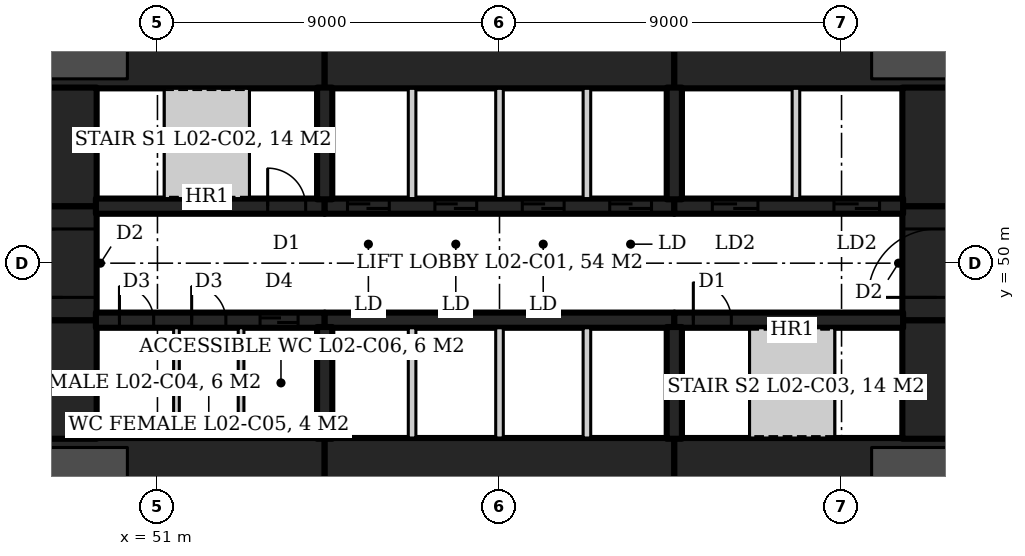
"""IFC4 building model, lengths in metres.
Left out: names, types, materials, properties, quantities, classifications, styles, units other than length and angle.
Written with IfcOpenShell. Run it as: python <this file> out.ifc"""

import sys

from ifc_helpers import new_model, si_unit, direction, frame, frame_2d, origin, origin_2d, place, context, subcontext, project, spatial, rectangle, circle, extrude, element, fill, save


model = new_model("IFC4")
c1 = context("Model", 3, precision=1e-05, world=origin(), true_north=direction((0.0, 1.0)))
c2 = subcontext(c1, "Body", "Model", "MODEL_VIEW")
j1 = project(units=[si_unit("LENGTHUNIT", "METRE"), si_unit("PLANEANGLEUNIT", "RADIAN")], contexts=[c1])
p1 = place(None, origin())
s1 = spatial("IfcSite", under=j1, at=p1, CompositionType="ELEMENT")
p2 = place(p1, origin())
s2 = spatial("IfcBuilding", under=s1, at=p2, CompositionType="ELEMENT")
p3 = place(p2, frame((0.0, 0.0, 15.0)))
s3 = spatial("IfcBuildingStorey", under=s2, at=p3, CompositionType="ELEMENT", Elevation=15.0)
for number, where, z_axis, x_axis in (
    (1, (71.691, 56.75, 0.0), (0.0, 0.0, 1.0), (1.0, 0.0, 0.0)),
    (2, (48.309, 56.75, 0.0), (0.0, 0.0, 1.0), (1.0, 0.0, 0.0)),
    (3, (48.309, 43.25, 0.0), (0.0, 0.0, 1.0), (1.0, 0.0, 0.0)),
    (4, (71.691, 43.25, 0.0), (0.0, 0.0, 1.0), (1.0, 0.0, 0.0)),
):
    element("IfcColumn", number, at=place(p3, frame(where, z_axis=z_axis, x_axis=x_axis)), inside=s3, PredefinedType="COLUMN", context=c2, shape_type="SweptSolid", body=[
        extrude(circle(Radius=1.9, at=origin_2d()), origin(), (0.0, 0.0, 1.0), 5.0),
    ])
p4 = place(p3, frame((47.6, 55.5, 0.0), z_axis=(0.0, 0.0, 1.0), x_axis=(1.0, 0.0, 0.0)))
e5 = element("IfcWall", 5, at=p4, inside=s3, PredefinedType="SHEAR", context=c2, shape_type="SweptSolid", body=[
    extrude(rectangle(XDim=7.8, YDim=1.8, at=frame_2d((3.9, 0.0))), origin(), (0.0, 0.0, 1.0), 5.0),
])
p5 = place(p3, frame((55.4, 55.5, 0.0), z_axis=(0.0, 0.0, 1.0), x_axis=(1.0, 0.0, 0.0)))
e6 = element("IfcWall", 6, at=p5, inside=s3, PredefinedType="SHEAR", context=c2, shape_type="SweptSolid", body=[
    extrude(rectangle(XDim=9.2, YDim=1.8, at=frame_2d((4.6, 0.0))), origin(), (0.0, 0.0, 1.0), 5.0),
])
for number, where, z_axis, x_axis in (
    (7, (64.6, 55.5, 0.0), (0.0, 0.0, 1.0), (1.0, 0.0, 0.0)),
    (8, (47.6, 44.5, 0.0), (0.0, 0.0, 1.0), (1.0, 0.0, 0.0)),
):
    element("IfcWall", number, at=place(p3, frame(where, z_axis=z_axis, x_axis=x_axis)), inside=s3, PredefinedType="SHEAR", context=c2, shape_type="SweptSolid", body=[
        extrude(rectangle(XDim=7.8, YDim=1.8, at=frame_2d((3.9, 0.0))), origin(), (0.0, 0.0, 1.0), 5.0),
    ])
p6 = place(p3, frame((55.4, 44.5, 0.0), z_axis=(0.0, 0.0, 1.0), x_axis=(1.0, 0.0, 0.0)))
e9 = element("IfcWall", 9, at=p6, inside=s3, PredefinedType="SHEAR", context=c2, shape_type="SweptSolid", body=[
    extrude(rectangle(XDim=9.2, YDim=1.8, at=frame_2d((4.6, 0.0))), origin(), (0.0, 0.0, 1.0), 5.0),
])
p7 = place(p3, frame((64.6, 44.5, 0.0), z_axis=(0.0, 0.0, 1.0), x_axis=(1.0, 0.0, 0.0)))
e10 = element("IfcWall", 10, at=p7, inside=s3, PredefinedType="SHEAR", context=c2, shape_type="SweptSolid", body=[
    extrude(rectangle(XDim=7.8, YDim=1.8, at=frame_2d((3.9, 0.0))), origin(), (0.0, 0.0, 1.0), 5.0),
])
p8 = place(p3, frame((71.5, 45.38, 0.0), z_axis=(0.0, 0.0, 1.0), x_axis=(0.0, 1.0, 0.0)))
e11 = element("IfcWall", 11, at=p8, inside=s3, PredefinedType="SHEAR", context=c2, shape_type="SweptSolid", body=[
    extrude(rectangle(XDim=3.12, YDim=1.8, at=frame_2d((1.56, 0.0))), origin(), (0.0, 0.0, 1.0), 5.0),
])
p9 = place(p3, frame((71.5, 48.5, 0.0), z_axis=(0.0, 0.0, 1.0), x_axis=(0.0, 1.0, 0.0)))
e12 = element("IfcWall", 12, at=p9, inside=s3, PredefinedType="SHEAR", context=c2, shape_type="SweptSolid", body=[
    extrude(rectangle(XDim=3.0, YDim=1.8, at=frame_2d((1.5, 0.0))), origin(), (0.0, 0.0, 1.0), 5.0),
])
p10 = place(p9, frame((0.6, 0.0, 0.0)))
e13 = element("IfcOpeningElement", 13, at=p10, cuts=e12, PredefinedType="OPENING", context=c2, shape_type="SweptSolid", body=[
    extrude(rectangle(XDim=1.8, YDim=2.1, at=frame_2d((0.9, 1.05))), frame((0.0, 0.91, 0.0), z_axis=(0.0, -1.0, 0.0), x_axis=(1.0, 0.0, 0.0)), (0.0, 0.0, 1.0), 1.82),
])
for number, where, z_axis, x_axis in (
    (14, (71.5, 51.5, 0.0), (0.0, 0.0, 1.0), (0.0, 1.0, 0.0)),
    (15, (48.5, 45.38, 0.0), (0.0, 0.0, 1.0), (0.0, 1.0, 0.0)),
):
    element("IfcWall", number, at=place(p3, frame(where, z_axis=z_axis, x_axis=x_axis)), inside=s3, PredefinedType="SHEAR", context=c2, shape_type="SweptSolid", body=[
        extrude(rectangle(XDim=3.12, YDim=1.8, at=frame_2d((1.56, 0.0))), origin(), (0.0, 0.0, 1.0), 5.0),
    ])
p11 = place(p3, frame((48.5, 48.5, 0.0), z_axis=(0.0, 0.0, 1.0), x_axis=(0.0, 1.0, 0.0)))
e16 = element("IfcWall", 16, at=p11, inside=s3, PredefinedType="SHEAR", context=c2, shape_type="SweptSolid", body=[
    extrude(rectangle(XDim=3.0, YDim=1.8, at=frame_2d((1.5, 0.0))), origin(), (0.0, 0.0, 1.0), 5.0),
])
p12 = place(p11, frame((0.6, 0.0, 0.0)))
e17 = element("IfcOpeningElement", 17, at=p12, cuts=e16, PredefinedType="OPENING", context=c2, shape_type="SweptSolid", body=[
    extrude(rectangle(XDim=1.8, YDim=2.1, at=frame_2d((0.9, 1.05))), frame((0.0, 0.91, 0.0), z_axis=(0.0, -1.0, 0.0), x_axis=(1.0, 0.0, 0.0)), (0.0, 0.0, 1.0), 1.82),
])
p13 = place(p3, frame((48.5, 51.5, 0.0), z_axis=(0.0, 0.0, 1.0), x_axis=(0.0, 1.0, 0.0)))
e18 = element("IfcWall", 18, at=p13, inside=s3, PredefinedType="SHEAR", context=c2, shape_type="SweptSolid", body=[
    extrude(rectangle(XDim=3.12, YDim=1.8, at=frame_2d((1.56, 0.0))), origin(), (0.0, 0.0, 1.0), 5.0),
])
p14 = place(p3, frame((49.38, 51.5, 0.0), z_axis=(0.0, 0.0, 1.0), x_axis=(1.0, 0.0, 0.0)))
e19 = element("IfcWall", 19, at=p14, inside=s3, PredefinedType="SHEAR", context=c2, shape_type="SweptSolid", body=[
    extrude(rectangle(XDim=6.02, YDim=0.4, at=frame_2d((3.01, 0.0))), origin(), (0.0, 0.0, 1.0), 5.0),
])
p15 = place(p14, frame((4.52, 0.0, 0.0)))
e20 = element("IfcOpeningElement", 20, at=p15, cuts=e19, PredefinedType="OPENING", context=c2, shape_type="SweptSolid", body=[
    extrude(rectangle(XDim=1.0, YDim=2.1, at=frame_2d((0.5, 1.05))), frame((0.0, 0.21, 0.0), z_axis=(0.0, -1.0, 0.0), x_axis=(1.0, 0.0, 0.0)), (0.0, 0.0, 1.0), 0.42),
])
p16 = place(p3, frame((55.4, 51.5, 0.0), z_axis=(0.0, 0.0, 1.0), x_axis=(1.0, 0.0, 0.0)))
e21 = element("IfcWall", 21, at=p16, inside=s3, PredefinedType="SHEAR", context=c2, shape_type="SweptSolid", body=[
    extrude(rectangle(XDim=9.2, YDim=0.4, at=frame_2d((4.6, 0.0))), origin(), (0.0, 0.0, 1.0), 5.0),
])
p17 = place(p16, frame((0.6, 0.0, 0.0)))
e22 = element("IfcOpeningElement", 22, at=p17, cuts=e21, PredefinedType="OPENING", context=c2, shape_type="SweptSolid", body=[
    extrude(rectangle(XDim=1.1, YDim=2.1, at=frame_2d((0.55, 1.05))), frame((0.0, 0.21, 0.0), z_axis=(0.0, -1.0, 0.0), x_axis=(1.0, 0.0, 0.0)), (0.0, 0.0, 1.0), 0.42),
])
p18 = place(p16, frame((2.9, 0.0, 0.0)))
e23 = element("IfcOpeningElement", 23, at=p18, cuts=e21, PredefinedType="OPENING", context=c2, shape_type="SweptSolid", body=[
    extrude(rectangle(XDim=1.1, YDim=2.1, at=frame_2d((0.55, 1.05))), frame((0.0, 0.21, 0.0), z_axis=(0.0, -1.0, 0.0), x_axis=(1.0, 0.0, 0.0)), (0.0, 0.0, 1.0), 0.42),
])
p19 = place(p16, frame((5.2, 0.0, 0.0)))
e24 = element("IfcOpeningElement", 24, at=p19, cuts=e21, PredefinedType="OPENING", context=c2, shape_type="SweptSolid", body=[
    extrude(rectangle(XDim=1.1, YDim=2.1, at=frame_2d((0.55, 1.05))), frame((0.0, 0.21, 0.0), z_axis=(0.0, -1.0, 0.0), x_axis=(1.0, 0.0, 0.0)), (0.0, 0.0, 1.0), 0.42),
])
p20 = place(p16, frame((7.5, 0.0, 0.0)))
e25 = element("IfcOpeningElement", 25, at=p20, cuts=e21, PredefinedType="OPENING", context=c2, shape_type="SweptSolid", body=[
    extrude(rectangle(XDim=1.1, YDim=2.1, at=frame_2d((0.55, 1.05))), frame((0.0, 0.21, 0.0), z_axis=(0.0, -1.0, 0.0), x_axis=(1.0, 0.0, 0.0)), (0.0, 0.0, 1.0), 0.42),
])
p21 = place(p3, frame((64.6, 51.5, 0.0), z_axis=(0.0, 0.0, 1.0), x_axis=(1.0, 0.0, 0.0)))
e26 = element("IfcWall", 26, at=p21, inside=s3, PredefinedType="SHEAR", context=c2, shape_type="SweptSolid", body=[
    extrude(rectangle(XDim=6.02, YDim=0.4, at=frame_2d((3.01, 0.0))), origin(), (0.0, 0.0, 1.0), 5.0),
])
p22 = place(p21, frame((1.0, 0.0, 0.0)))
e27 = element("IfcOpeningElement", 27, at=p22, cuts=e26, PredefinedType="OPENING", context=c2, shape_type="SweptSolid", body=[
    extrude(rectangle(XDim=1.2, YDim=2.1, at=frame_2d((0.6, 1.05))), frame((0.0, 0.21, 0.0), z_axis=(0.0, -1.0, 0.0), x_axis=(1.0, 0.0, 0.0)), (0.0, 0.0, 1.0), 0.42),
])
p23 = place(p21, frame((4.2, 0.0, 0.0)))
e28 = element("IfcOpeningElement", 28, at=p23, cuts=e26, PredefinedType="OPENING", context=c2, shape_type="SweptSolid", body=[
    extrude(rectangle(XDim=1.2, YDim=2.1, at=frame_2d((0.6, 1.05))), frame((0.0, 0.21, 0.0), z_axis=(0.0, -1.0, 0.0), x_axis=(1.0, 0.0, 0.0)), (0.0, 0.0, 1.0), 0.42),
])
p24 = place(p3, frame((49.38, 48.5, 0.0), z_axis=(0.0, 0.0, 1.0), x_axis=(1.0, 0.0, 0.0)))
e29 = element("IfcWall", 29, at=p24, inside=s3, PredefinedType="SHEAR", context=c2, shape_type="SweptSolid", body=[
    extrude(rectangle(XDim=6.02, YDim=0.4, at=frame_2d((3.01, 0.0))), origin(), (0.0, 0.0, 1.0), 5.0),
])
p25 = place(p24, frame((0.62, 0.0, 0.0)))
e30 = element("IfcOpeningElement", 30, at=p25, cuts=e29, PredefinedType="OPENING", context=c2, shape_type="SweptSolid", body=[
    extrude(rectangle(XDim=0.9, YDim=2.1, at=frame_2d((0.45, 1.05))), frame((0.0, 0.21, 0.0), z_axis=(0.0, -1.0, 0.0), x_axis=(1.0, 0.0, 0.0)), (0.0, 0.0, 1.0), 0.42),
])
p26 = place(p24, frame((2.52, 0.0, 0.0)))
e31 = element("IfcOpeningElement", 31, at=p26, cuts=e29, PredefinedType="OPENING", context=c2, shape_type="SweptSolid", body=[
    extrude(rectangle(XDim=0.9, YDim=2.1, at=frame_2d((0.45, 1.05))), frame((0.0, 0.21, 0.0), z_axis=(0.0, -1.0, 0.0), x_axis=(1.0, 0.0, 0.0)), (0.0, 0.0, 1.0), 0.42),
])
p27 = place(p24, frame((4.32, 0.0, 0.0)))
e32 = element("IfcOpeningElement", 32, at=p27, cuts=e29, PredefinedType="OPENING", context=c2, shape_type="SweptSolid", body=[
    extrude(rectangle(XDim=1.0, YDim=2.1, at=frame_2d((0.5, 1.05))), frame((0.0, 0.21, 0.0), z_axis=(0.0, -1.0, 0.0), x_axis=(1.0, 0.0, 0.0)), (0.0, 0.0, 1.0), 0.42),
])
p28 = place(p3, frame((55.4, 48.5, 0.0), z_axis=(0.0, 0.0, 1.0), x_axis=(1.0, 0.0, 0.0)))
e33 = element("IfcWall", 33, at=p28, inside=s3, PredefinedType="SHEAR", context=c2, shape_type="SweptSolid", body=[
    extrude(rectangle(XDim=9.2, YDim=0.4, at=frame_2d((4.6, 0.0))), origin(), (0.0, 0.0, 1.0), 5.0),
])
p29 = place(p3, frame((64.6, 48.5, 0.0), z_axis=(0.0, 0.0, 1.0), x_axis=(1.0, 0.0, 0.0)))
e34 = element("IfcWall", 34, at=p29, inside=s3, PredefinedType="SHEAR", context=c2, shape_type="SweptSolid", body=[
    extrude(rectangle(XDim=6.02, YDim=0.4, at=frame_2d((3.01, 0.0))), origin(), (0.0, 0.0, 1.0), 5.0),
])
p30 = place(p29, frame((0.5, 0.0, 0.0)))
e35 = element("IfcOpeningElement", 35, at=p30, cuts=e34, PredefinedType="OPENING", context=c2, shape_type="SweptSolid", body=[
    extrude(rectangle(XDim=1.0, YDim=2.1, at=frame_2d((0.5, 1.05))), frame((0.0, 0.21, 0.0), z_axis=(0.0, -1.0, 0.0), x_axis=(1.0, 0.0, 0.0)), (0.0, 0.0, 1.0), 0.42),
])
for number, where, z_axis, x_axis in (
    (36, (55.4, 51.68, 0.0), (0.0, 0.0, 1.0), (0.0, 1.0, 0.0)),
    (37, (64.6, 51.68, 0.0), (0.0, 0.0, 1.0), (0.0, 1.0, 0.0)),
    (38, (55.4, 48.32, 0.0), (0.0, 0.0, 1.0), (0.0, -1.0, 0.0)),
    (39, (64.6, 48.32, 0.0), (0.0, 0.0, 1.0), (0.0, -1.0, 0.0)),
):
    element("IfcWall", number, at=place(p3, frame(where, z_axis=z_axis, x_axis=x_axis)), inside=s3, PredefinedType="SHEAR", context=c2, shape_type="SweptSolid", body=[
        extrude(rectangle(XDim=2.94, YDim=0.4, at=frame_2d((1.47, 0.0))), origin(), (0.0, 0.0, 1.0), 5.0),
    ])
for number, where, z_axis, x_axis in (
    (40, (57.7, 51.7, 0.0), (0.0, 0.0, 1.0), (0.0, 1.0, 0.0)),
    (41, (60.0, 51.7, 0.0), (0.0, 0.0, 1.0), (0.0, 1.0, 0.0)),
    (42, (62.3, 51.7, 0.0), (0.0, 0.0, 1.0), (0.0, 1.0, 0.0)),
    (43, (57.7, 45.4, 0.0), (0.0, 0.0, 1.0), (0.0, 1.0, 0.0)),
    (44, (60.0, 45.4, 0.0), (0.0, 0.0, 1.0), (0.0, 1.0, 0.0)),
    (45, (62.3, 45.4, 0.0), (0.0, 0.0, 1.0), (0.0, 1.0, 0.0)),
    (46, (67.8, 51.7, 0.0), (0.0, 0.0, 1.0), (0.0, 1.0, 0.0)),
):
    element("IfcWall", number, at=place(p3, frame(where, z_axis=z_axis, x_axis=x_axis)), inside=s3, PredefinedType="PARTITIONING", context=c2, shape_type="SweptSolid", body=[
        extrude(rectangle(XDim=2.9, YDim=0.2, at=frame_2d((1.45, 0.0))), origin(), (0.0, 0.0, 1.0), 5.0),
    ])
for number, where, z_axis, x_axis in (
    (47, (51.5, 45.4, 0.0), (0.0, 0.0, 1.0), (0.0, 1.0, 0.0)),
    (48, (53.2, 45.4, 0.0), (0.0, 0.0, 1.0), (0.0, 1.0, 0.0)),
):
    element("IfcWall", number, at=place(p3, frame(where, z_axis=z_axis, x_axis=x_axis)), inside=s3, PredefinedType="PARTITIONING", context=c2, shape_type="SweptSolid", body=[
        extrude(rectangle(XDim=2.9, YDim=0.15, at=frame_2d((1.45, 0.0))), origin(), (0.0, 0.0, 1.0), 4.7),
    ])
p31 = place(p15, origin())
e49 = element("IfcDoor", 49, at=p31, inside=s3, OperationType="SINGLE_SWING_LEFT", PredefinedType="DOOR", context=c2, shape_type="SweptSolid", body=[
    extrude(rectangle(XDim=1.0, YDim=2.1, at=frame_2d((0.5, 1.05))), frame((0.0, 0.025, 0.0), z_axis=(0.0, -1.0, 0.0), x_axis=(1.0, 0.0, 0.0)), (0.0, 0.0, 1.0), 0.05),
])
fill(e20, e49)
p32 = place(p30, origin())
e50 = element("IfcDoor", 50, at=p32, inside=s3, OperationType="SINGLE_SWING_LEFT", PredefinedType="DOOR", context=c2, shape_type="SweptSolid", body=[
    extrude(rectangle(XDim=1.0, YDim=2.1, at=frame_2d((0.5, 1.05))), frame((0.0, 0.025, 0.0), z_axis=(0.0, -1.0, 0.0), x_axis=(1.0, 0.0, 0.0)), (0.0, 0.0, 1.0), 0.05),
])
fill(e35, e50)
p33 = place(p22, origin())
e51 = element("IfcDoor", 51, at=p33, inside=s3, OperationType="SLIDING_TO_LEFT", PredefinedType="DOOR", context=c2, shape_type="SweptSolid", body=[
    extrude(rectangle(XDim=1.2, YDim=2.1, at=frame_2d((0.6, 1.05))), frame((0.0, 0.025, 0.0), z_axis=(0.0, -1.0, 0.0), x_axis=(1.0, 0.0, 0.0)), (0.0, 0.0, 1.0), 0.05),
])
fill(e27, e51)
p34 = place(p23, origin())
e52 = element("IfcDoor", 52, at=p34, inside=s3, OperationType="SLIDING_TO_LEFT", PredefinedType="DOOR", context=c2, shape_type="SweptSolid", body=[
    extrude(rectangle(XDim=1.2, YDim=2.1, at=frame_2d((0.6, 1.05))), frame((0.0, 0.025, 0.0), z_axis=(0.0, -1.0, 0.0), x_axis=(1.0, 0.0, 0.0)), (0.0, 0.0, 1.0), 0.05),
])
fill(e28, e52)
p35 = place(p17, origin())
e53 = element("IfcDoor", 53, at=p35, inside=s3, OperationType="SLIDING_TO_LEFT", PredefinedType="DOOR", context=c2, shape_type="SweptSolid", body=[
    extrude(rectangle(XDim=1.1, YDim=2.1, at=frame_2d((0.55, 1.05))), frame((0.0, 0.025, 0.0), z_axis=(0.0, -1.0, 0.0), x_axis=(1.0, 0.0, 0.0)), (0.0, 0.0, 1.0), 0.05),
])
fill(e22, e53)
p36 = place(p18, origin())
e54 = element("IfcDoor", 54, at=p36, inside=s3, OperationType="SLIDING_TO_LEFT", PredefinedType="DOOR", context=c2, shape_type="SweptSolid", body=[
    extrude(rectangle(XDim=1.1, YDim=2.1, at=frame_2d((0.55, 1.05))), frame((0.0, 0.025, 0.0), z_axis=(0.0, -1.0, 0.0), x_axis=(1.0, 0.0, 0.0)), (0.0, 0.0, 1.0), 0.05),
])
fill(e23, e54)
p37 = place(p19, origin())
e55 = element("IfcDoor", 55, at=p37, inside=s3, OperationType="SLIDING_TO_LEFT", PredefinedType="DOOR", context=c2, shape_type="SweptSolid", body=[
    extrude(rectangle(XDim=1.1, YDim=2.1, at=frame_2d((0.55, 1.05))), frame((0.0, 0.025, 0.0), z_axis=(0.0, -1.0, 0.0), x_axis=(1.0, 0.0, 0.0)), (0.0, 0.0, 1.0), 0.05),
])
fill(e24, e55)
p38 = place(p20, origin())
e56 = element("IfcDoor", 56, at=p38, inside=s3, OperationType="SLIDING_TO_LEFT", PredefinedType="DOOR", context=c2, shape_type="SweptSolid", body=[
    extrude(rectangle(XDim=1.1, YDim=2.1, at=frame_2d((0.55, 1.05))), frame((0.0, 0.025, 0.0), z_axis=(0.0, -1.0, 0.0), x_axis=(1.0, 0.0, 0.0)), (0.0, 0.0, 1.0), 0.05),
])
fill(e25, e56)
p39 = place(p25, origin())
e57 = element("IfcDoor", 57, at=p39, inside=s3, OperationType="SINGLE_SWING_RIGHT", PredefinedType="DOOR", context=c2, shape_type="SweptSolid", body=[
    extrude(rectangle(XDim=0.9, YDim=2.1, at=frame_2d((0.45, 1.05))), frame((0.0, 0.025, 0.0), z_axis=(0.0, -1.0, 0.0), x_axis=(1.0, 0.0, 0.0)), (0.0, 0.0, 1.0), 0.05),
])
fill(e30, e57)
p40 = place(p26, origin())
e58 = element("IfcDoor", 58, at=p40, inside=s3, OperationType="SINGLE_SWING_RIGHT", PredefinedType="DOOR", context=c2, shape_type="SweptSolid", body=[
    extrude(rectangle(XDim=0.9, YDim=2.1, at=frame_2d((0.45, 1.05))), frame((0.0, 0.025, 0.0), z_axis=(0.0, -1.0, 0.0), x_axis=(1.0, 0.0, 0.0)), (0.0, 0.0, 1.0), 0.05),
])
fill(e31, e58)
p41 = place(p27, origin())
e59 = element("IfcDoor", 59, at=p41, inside=s3, OperationType="SLIDING_TO_LEFT", PredefinedType="DOOR", context=c2, shape_type="SweptSolid", body=[
    extrude(rectangle(XDim=1.0, YDim=2.1, at=frame_2d((0.5, 1.05))), frame((0.0, 0.025, 0.0), z_axis=(0.0, -1.0, 0.0), x_axis=(1.0, 0.0, 0.0)), (0.0, 0.0, 1.0), 0.05),
])
fill(e32, e59)
p42 = place(p10, origin())
e60 = element("IfcDoor", 60, at=p42, inside=s3, OperationType="DOUBLE_DOOR_DOUBLE_SWING", PredefinedType="DOOR", context=c2, shape_type="SweptSolid", body=[
    extrude(rectangle(XDim=1.8, YDim=2.1, at=frame_2d((0.9, 1.05))), frame((0.0, 0.025, 0.0), z_axis=(0.0, -1.0, 0.0), x_axis=(1.0, 0.0, 0.0)), (0.0, 0.0, 1.0), 0.05),
])
fill(e13, e60)
p43 = place(p12, origin())
e61 = element("IfcDoor", 61, at=p43, inside=s3, OperationType="DOUBLE_DOOR_DOUBLE_SWING", PredefinedType="DOOR", context=c2, shape_type="SweptSolid", body=[
    extrude(rectangle(XDim=1.8, YDim=2.1, at=frame_2d((0.9, 1.05))), frame((0.0, 0.025, 0.0), z_axis=(0.0, -1.0, 0.0), x_axis=(1.0, 0.0, 0.0)), (0.0, 0.0, 1.0), 0.05),
])
fill(e17, e61)
save(model, sys.argv[1])
